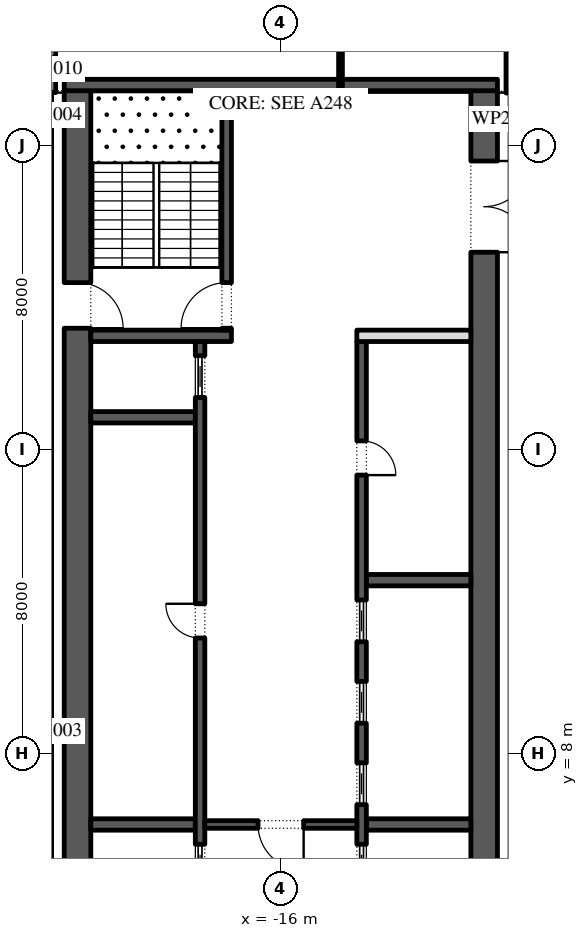
"""IFC4 building model, lengths in metres.
Left out: names, types, materials, properties, quantities, classifications, styles, units other than length and angle.
Written with IfcOpenShell. Run it as: python <this file> out.ifc"""

import sys

from ifc_helpers import new_model, si_unit, direction, frame, frame_2d, origin, place, context, subcontext, project, spatial, rectangle, extrude, element, fill, save


model = new_model("IFC4")
c1 = context("Model", 3, precision=1e-05, world=origin(), true_north=direction((0.0, 1.0)))
c2 = subcontext(c1, "Body", "Model", "MODEL_VIEW")
j1 = project(units=[si_unit("LENGTHUNIT", "METRE"), si_unit("PLANEANGLEUNIT", "RADIAN")], contexts=[c1])
p1 = place(None, origin())
s1 = spatial("IfcSite", under=j1, at=p1, CompositionType="ELEMENT")
p2 = place(p1, origin())
s2 = spatial("IfcBuilding", under=s1, at=p2, CompositionType="ELEMENT")
p3 = place(p2, frame((0.0, 0.0, 205.2)))
s3 = spatial("IfcBuildingStorey", under=s2, at=p3, CompositionType="ELEMENT", Elevation=205.2)
p4 = place(p3, frame((-33.157, 30.092, 0.0), z_axis=(0.0, 0.0, 1.0), x_axis=(0.224950279389, -0.974370243697, 0.0)))
e1 = element("IfcWall", 1, at=p4, inside=s3, PredefinedType="STANDARD", context=c2, shape_type="SweptSolid", body=[
    extrude(rectangle(XDim=49.5, YDim=0.3, at=frame_2d((24.75, 0.0))), origin(), (0.0, 0.0, 1.0), 4.0),
])
p5 = place(p4, frame((2.207, 0.0, 0.0)))
e2 = element("IfcOpeningElement", 2, at=p5, cuts=e1, PredefinedType="OPENING", context=c2, shape_type="SweptSolid", body=[
    extrude(rectangle(XDim=2.4, YDim=3.5, at=frame_2d((1.2, 1.75))), frame((0.0, 0.16, 0.0), z_axis=(0.0, -1.0, 0.0), x_axis=(1.0, 0.0, 0.0)), (0.0, 0.0, 1.0), 0.32),
])
p6 = place(p4, frame((8.121, 0.0, 0.45)))
e3 = element("IfcOpeningElement", 3, at=p6, cuts=e1, PredefinedType="OPENING", context=c2, shape_type="SweptSolid", body=[
    extrude(rectangle(XDim=4.5, YDim=2.825, at=frame_2d((2.25, 1.413))), frame((0.0, 0.16, 0.0), z_axis=(0.0, -1.0, 0.0), x_axis=(1.0, 0.0, 0.0)), (0.0, 0.0, 1.0), 0.32),
])
p7 = place(p4, frame((15.236, 0.0, 0.45)))
e4 = element("IfcOpeningElement", 4, at=p7, cuts=e1, PredefinedType="OPENING", context=c2, shape_type="SweptSolid", body=[
    extrude(rectangle(XDim=4.5, YDim=2.95, at=frame_2d((2.25, 1.475))), frame((0.0, 0.16, 0.0), z_axis=(0.0, -1.0, 0.0), x_axis=(1.0, 0.0, 0.0)), (0.0, 0.0, 1.0), 0.32),
])
p8 = place(p4, frame((22.35, 0.0, 0.45)))
e5 = element("IfcOpeningElement", 5, at=p8, cuts=e1, PredefinedType="OPENING", context=c2, shape_type="SweptSolid", body=[
    extrude(rectangle(XDim=4.5, YDim=3.0, at=frame_2d((2.25, 1.5))), frame((0.0, 0.16, 0.0), z_axis=(0.0, -1.0, 0.0), x_axis=(1.0, 0.0, 0.0)), (0.0, 0.0, 1.0), 0.32),
])
p9 = place(p4, frame((30.514, 0.0, 0.0)))
e6 = element("IfcOpeningElement", 6, at=p9, cuts=e1, PredefinedType="OPENING", context=c2, shape_type="SweptSolid", body=[
    extrude(rectangle(XDim=2.4, YDim=3.5, at=frame_2d((1.2, 1.75))), frame((0.0, 0.16, 0.0), z_axis=(0.0, -1.0, 0.0), x_axis=(1.0, 0.0, 0.0)), (0.0, 0.0, 1.0), 0.32),
])
p10 = place(p4, frame((36.579, 0.0, 0.45)))
e7 = element("IfcOpeningElement", 7, at=p10, cuts=e1, PredefinedType="OPENING", context=c2, shape_type="SweptSolid", body=[
    extrude(rectangle(XDim=4.5, YDim=3.05, at=frame_2d((2.25, 1.525))), frame((0.0, 0.16, 0.0), z_axis=(0.0, -1.0, 0.0), x_axis=(1.0, 0.0, 0.0)), (0.0, 0.0, 1.0), 0.32),
])
p11 = place(p4, frame((43.693, 0.0, 0.45)))
e8 = element("IfcOpeningElement", 8, at=p11, cuts=e1, PredefinedType="OPENING", context=c2, shape_type="SweptSolid", body=[
    extrude(rectangle(XDim=4.5, YDim=3.05, at=frame_2d((2.25, 1.525))), frame((0.0, 0.16, 0.0), z_axis=(0.0, -1.0, 0.0), x_axis=(1.0, 0.0, 0.0)), (0.0, 0.0, 1.0), 0.32),
])
p12 = place(p3, frame((-21.35, -2.45, 0.0), z_axis=(0.0, 0.0, 1.0), x_axis=(0.0, 1.0, 0.0)))
e9 = element("IfcWall", 9, at=p12, inside=s3, PredefinedType="SHEAR", context=c2, shape_type="SweptSolid", body=[
    extrude(rectangle(XDim=27.9, YDim=0.7, at=frame_2d((13.95, 0.0))), origin(), (0.0, 0.0, 1.0), 4.0),
])
p13 = place(p12, frame((5.05, 0.0, 0.0)))
e10 = element("IfcOpeningElement", 10, at=p13, cuts=e9, PredefinedType="OPENING", context=c2, shape_type="SweptSolid", body=[
    extrude(rectangle(XDim=1.2, YDim=2.1, at=frame_2d((0.6, 1.05))), frame((0.0, 0.36, 0.0), z_axis=(0.0, -1.0, 0.0), x_axis=(1.0, 0.0, 0.0)), (0.0, 0.0, 1.0), 0.72),
])
p14 = place(p12, frame((21.65, 0.0, 0.0)))
e11 = element("IfcOpeningElement", 11, at=p14, cuts=e9, PredefinedType="OPENING", context=c2, shape_type="SweptSolid", body=[
    extrude(rectangle(XDim=1.2, YDim=2.1, at=frame_2d((0.6, 1.05))), frame((0.0, 0.36, 0.0), z_axis=(0.0, -1.0, 0.0), x_axis=(1.0, 0.0, 0.0)), (0.0, 0.0, 1.0), 0.72),
])
p15 = place(p3, frame((-10.65, -2.45, 0.0), z_axis=(0.0, 0.0, 1.0), x_axis=(0.0, 1.0, 0.0)))
e12 = element("IfcWall", 12, at=p15, inside=s3, PredefinedType="SHEAR", context=c2, shape_type="SweptSolid", body=[
    extrude(rectangle(XDim=27.9, YDim=0.7, at=frame_2d((13.95, 0.0))), origin(), (0.0, 0.0, 1.0), 4.0),
])
p16 = place(p15, frame((23.65, 0.0, 0.0)))
e13 = element("IfcOpeningElement", 13, at=p16, cuts=e12, PredefinedType="OPENING", context=c2, shape_type="SweptSolid", body=[
    extrude(rectangle(XDim=2.4, YDim=2.1, at=frame_2d((1.2, 1.05))), frame((0.0, 0.36, 0.0), z_axis=(0.0, -1.0, 0.0), x_axis=(1.0, 0.0, 0.0)), (0.0, 0.0, 1.0), 0.72),
])
p17 = place(p15, frame((1.087, 0.0, 0.0)))
e14 = element("IfcOpeningElement", 14, at=p17, cuts=e12, PredefinedType="OPENING", context=c2, shape_type="SweptSolid", body=[
    extrude(rectangle(XDim=0.9, YDim=2.1, at=frame_2d((0.45, 1.05))), frame((0.0, 0.36, 0.0), z_axis=(0.0, -1.0, 0.0), x_axis=(1.0, 0.0, 0.0)), (0.0, 0.0, 1.0), 0.72),
])
p18 = place(p15, frame((4.262, 0.0, 0.0)))
e15 = element("IfcOpeningElement", 15, at=p18, cuts=e12, PredefinedType="OPENING", context=c2, shape_type="SweptSolid", body=[
    extrude(rectangle(XDim=1.0, YDim=2.1, at=frame_2d((0.5, 1.05))), frame((0.0, 0.36, 0.0), z_axis=(0.0, -1.0, 0.0), x_axis=(1.0, 0.0, 0.0)), (0.0, 0.0, 1.0), 0.72),
])
p19 = place(p3, frame((-21.7, 25.6, 0.0), z_axis=(0.0, 0.0, 1.0), x_axis=(1.0, 0.0, 0.0)))
e16 = element("IfcWall", 16, at=p19, inside=s3, PredefinedType="SHEAR", context=c2, shape_type="SweptSolid", body=[
    extrude(rectangle(XDim=11.4, YDim=0.3, at=frame_2d((5.7, 0.0))), origin(), (0.0, 0.0, 1.0), 4.0),
])
p20 = place(p3, frame((-21.0, 19.0, 0.0), z_axis=(0.0, 0.0, 1.0), x_axis=(1.0, 0.0, 0.0)))
e17 = element("IfcWall", 17, at=p20, inside=s3, PredefinedType="SHEAR", context=c2, shape_type="SweptSolid", body=[
    extrude(rectangle(XDim=3.7, YDim=0.3, at=frame_2d((1.85, 0.0))), origin(), (0.0, 0.0, 1.0), 4.0),
])
p21 = place(p3, frame((-17.425, 19.15, 0.0), z_axis=(0.0, 0.0, 1.0), x_axis=(0.0, 1.0, 0.0)))
e18 = element("IfcWall", 18, at=p21, inside=s3, PredefinedType="SHEAR", context=c2, shape_type="SweptSolid", body=[
    extrude(rectangle(XDim=6.3, YDim=0.25, at=frame_2d((3.15, 0.0))), origin(), (0.0, 0.0, 1.0), 4.0),
])
p22 = place(p21, frame((0.05, 0.0, 0.0)))
e19 = element("IfcOpeningElement", 19, at=p22, cuts=e18, PredefinedType="OPENING", context=c2, shape_type="SweptSolid", body=[
    extrude(rectangle(XDim=1.2, YDim=2.1, at=frame_2d((0.6, 1.05))), frame((0.0, 0.135, 0.0), z_axis=(0.0, -1.0, 0.0), x_axis=(1.0, 0.0, 0.0)), (0.0, 0.0, 1.0), 0.27),
])
for number, where, z_axis, x_axis in (
    (20, (-21.0, 6.143, 0.0), (0.0, 0.0, 1.0), (1.0, 0.0, 0.0)),
    (21, (-21.0, 16.857, 0.0), (0.0, 0.0, 1.0), (1.0, 0.0, 0.0)),
):
    element("IfcWall", number, at=place(p3, frame(where, z_axis=z_axis, x_axis=x_axis)), inside=s3, PredefinedType="SHEAR", context=c2, shape_type="SweptSolid", body=[
        extrude(rectangle(XDim=2.75, YDim=0.3, at=frame_2d((1.375, 0.0))), origin(), (0.0, 0.0, 1.0), 4.0),
    ])
p23 = place(p3, frame((-18.125, 4.15, 0.0), z_axis=(0.0, 0.0, 1.0), x_axis=(0.0, 1.0, 0.0)))
e22 = element("IfcWall", 22, at=p23, inside=s3, PredefinedType="SHEAR", context=c2, shape_type="SweptSolid", body=[
    extrude(rectangle(XDim=14.7, YDim=0.25, at=frame_2d((7.35, 0.0))), origin(), (0.0, 0.0, 1.0), 4.0),
])
p24 = place(p23, frame((6.9, 0.0, 0.0)))
e23 = element("IfcOpeningElement", 23, at=p24, cuts=e22, PredefinedType="OPENING", context=c2, shape_type="SweptSolid", body=[
    extrude(rectangle(XDim=0.9, YDim=2.1, at=frame_2d((0.45, 1.05))), frame((0.0, 0.135, 0.0), z_axis=(0.0, -1.0, 0.0), x_axis=(1.0, 0.0, 0.0)), (0.0, 0.0, 1.0), 0.27),
])
p25 = place(p23, frame((0.371, 0.0, 0.0)))
e24 = element("IfcOpeningElement", 24, at=p25, cuts=e22, PredefinedType="OPENING", context=c2, shape_type="SweptSolid", body=[
    extrude(rectangle(XDim=1.1, YDim=2.1, at=frame_2d((0.55, 1.05))), frame((0.0, 0.135, 0.0), z_axis=(0.0, -1.0, 0.0), x_axis=(1.0, 0.0, 0.0)), (0.0, 0.0, 1.0), 0.27),
])
p26 = place(p23, frame((13.229, 0.0, 0.0)))
e25 = element("IfcOpeningElement", 25, at=p26, cuts=e22, PredefinedType="OPENING", context=c2, shape_type="SweptSolid", body=[
    extrude(rectangle(XDim=1.1, YDim=2.1, at=frame_2d((0.55, 1.05))), frame((0.0, 0.135, 0.0), z_axis=(0.0, -1.0, 0.0), x_axis=(1.0, 0.0, 0.0)), (0.0, 0.0, 1.0), 0.27),
])
for number, where, z_axis, x_axis in (
    (26, (-13.75, 6.143, 0.0), (0.0, 0.0, 1.0), (1.0, 0.0, 0.0)),
    (27, (-13.75, 12.571, 0.0), (0.0, 0.0, 1.0), (1.0, 0.0, 0.0)),
):
    element("IfcWall", number, at=place(p3, frame(where, z_axis=z_axis, x_axis=x_axis)), inside=s3, PredefinedType="SHEAR", context=c2, shape_type="SweptSolid", body=[
        extrude(rectangle(XDim=2.75, YDim=0.3, at=frame_2d((1.375, 0.0))), origin(), (0.0, 0.0, 1.0), 4.0),
    ])
p27 = place(p3, frame((-13.875, -2.45, 0.0), z_axis=(0.0, 0.0, 1.0), x_axis=(0.0, 1.0, 0.0)))
e28 = element("IfcWall", 28, at=p27, inside=s3, PredefinedType="SHEAR", context=c2, shape_type="SweptSolid", body=[
    extrude(rectangle(XDim=21.3, YDim=0.25, at=frame_2d((10.65, 0.0))), origin(), (0.0, 0.0, 1.0), 4.0),
])
p28 = place(p27, frame((17.786, 0.0, 0.0)))
e29 = element("IfcOpeningElement", 29, at=p28, cuts=e28, PredefinedType="OPENING", context=c2, shape_type="SweptSolid", body=[
    extrude(rectangle(XDim=0.9, YDim=2.1, at=frame_2d((0.45, 1.05))), frame((0.0, 0.135, 0.0), z_axis=(0.0, -1.0, 0.0), x_axis=(1.0, 0.0, 0.0)), (0.0, 0.0, 1.0), 0.27),
])
p29 = place(p27, frame((6.971, 0.0, 0.0)))
e30 = element("IfcOpeningElement", 30, at=p29, cuts=e28, PredefinedType="OPENING", context=c2, shape_type="SweptSolid", body=[
    extrude(rectangle(XDim=1.1, YDim=2.1, at=frame_2d((0.55, 1.05))), frame((0.0, 0.135, 0.0), z_axis=(0.0, -1.0, 0.0), x_axis=(1.0, 0.0, 0.0)), (0.0, 0.0, 1.0), 0.27),
])
p30 = place(p27, frame((9.114, 0.0, 0.0)))
e31 = element("IfcOpeningElement", 31, at=p30, cuts=e28, PredefinedType="OPENING", context=c2, shape_type="SweptSolid", body=[
    extrude(rectangle(XDim=1.1, YDim=2.1, at=frame_2d((0.55, 1.05))), frame((0.0, 0.135, 0.0), z_axis=(0.0, -1.0, 0.0), x_axis=(1.0, 0.0, 0.0)), (0.0, 0.0, 1.0), 0.27),
])
p31 = place(p27, frame((11.257, 0.0, 0.0)))
e32 = element("IfcOpeningElement", 32, at=p31, cuts=e28, PredefinedType="OPENING", context=c2, shape_type="SweptSolid", body=[
    extrude(rectangle(XDim=1.1, YDim=2.1, at=frame_2d((0.55, 1.05))), frame((0.0, 0.135, 0.0), z_axis=(0.0, -1.0, 0.0), x_axis=(1.0, 0.0, 0.0)), (0.0, 0.0, 1.0), 0.27),
])
p32 = place(p27, frame((13.4, 0.0, 0.0)))
e33 = element("IfcOpeningElement", 33, at=p32, cuts=e28, PredefinedType="OPENING", context=c2, shape_type="SweptSolid", body=[
    extrude(rectangle(XDim=1.1, YDim=2.1, at=frame_2d((0.55, 1.05))), frame((0.0, 0.135, 0.0), z_axis=(0.0, -1.0, 0.0), x_axis=(1.0, 0.0, 0.0)), (0.0, 0.0, 1.0), 0.27),
])
p33 = place(p3, frame((-14.0, 19.0, 0.0), z_axis=(0.0, 0.0, 1.0), x_axis=(1.0, 0.0, 0.0)))
e34 = element("IfcWall", 34, at=p33, inside=s3, PredefinedType="PARTITIONING", context=c2, shape_type="SweptSolid", body=[
    extrude(rectangle(XDim=3.0, YDim=0.3, at=frame_2d((1.5, 0.0))), origin(), (0.0, 0.0, 1.0), 4.0),
])
p34 = place(p3, frame((-18.0, 6.143, 0.0), z_axis=(0.0, 0.0, 1.0), x_axis=(1.0, 0.0, 0.0)))
e35 = element("IfcWall", 35, at=p34, inside=s3, PredefinedType="SHEAR", context=c2, shape_type="SweptSolid", body=[
    extrude(rectangle(XDim=4.0, YDim=0.2, at=frame_2d((2.0, 0.0))), origin(), (0.0, 0.0, 1.0), 4.0),
])
p35 = place(p34, frame((1.4, 0.0, 0.0)))
e36 = element("IfcOpeningElement", 36, at=p35, cuts=e35, PredefinedType="OPENING", context=c2, shape_type="SweptSolid", body=[
    extrude(rectangle(XDim=1.2, YDim=2.1, at=frame_2d((0.6, 1.05))), frame((0.0, 0.11, 0.0), z_axis=(0.0, -1.0, 0.0), x_axis=(1.0, 0.0, 0.0)), (0.0, 0.0, 1.0), 0.22),
])
p36 = place(p3, frame((-22.0, 27.125, 0.0), z_axis=(0.0, 0.0, 1.0), x_axis=(0.0, -1.0, 0.0)))
e37 = element("IfcWall", 37, at=p36, inside=s3, PredefinedType="PARTITIONING", context=c2, shape_type="SweptSolid", body=[
    extrude(rectangle(XDim=1.725, YDim=0.15, at=frame_2d((0.863, 0.0))), origin(), (0.0, 0.0, 1.0), 4.0),
])
p37 = place(p3, frame((-14.43, 38.193, 0.0), z_axis=(0.0, 0.0, 1.0), x_axis=(0.0, -1.0, 0.0)))
e38 = element("IfcWall", 38, at=p37, inside=s3, PredefinedType="PARTITIONING", context=c2, shape_type="SweptSolid", body=[
    extrude(rectangle(XDim=12.793, YDim=0.1, at=frame_2d((6.396, 0.0))), origin(), (0.0, 0.0, 1.0), 4.0),
])
p38 = place(p37, frame((4.473, 0.0, 0.0)))
e39 = element("IfcOpeningElement", 39, at=p38, cuts=e38, PredefinedType="OPENING", context=c2, shape_type="SweptSolid", body=[
    extrude(rectangle(XDim=0.9, YDim=2.1, at=frame_2d((0.45, 1.05))), frame((0.0, 0.06, 0.0), z_axis=(0.0, -1.0, 0.0), x_axis=(1.0, 0.0, 0.0)), (0.0, 0.0, 1.0), 0.12),
])
p39 = place(p3, frame((-10.0, 25.39, 0.0), z_axis=(0.0, 0.0, 1.0), x_axis=(0.0, 1.0, 0.0)))
e40 = element("IfcWall", 40, at=p39, inside=s3, PredefinedType="PARTITIONING", context=c2, shape_type="SweptSolid", body=[
    extrude(rectangle(XDim=1.81, YDim=0.15, at=frame_2d((0.905, 0.0))), origin(), (0.0, 0.0, 1.0), 4.0),
])
p40 = place(p24, origin())
e41 = element("IfcDoor", 41, at=p40, inside=s3, OperationType="SINGLE_SWING_LEFT", PredefinedType="DOOR", context=c2, shape_type="SweptSolid", body=[
    extrude(rectangle(XDim=0.9, YDim=2.1, at=frame_2d((0.45, 1.05))), frame((0.0, 0.125, 0.0), z_axis=(0.0, -1.0, 0.0), x_axis=(1.0, 0.0, 0.0)), (0.0, 0.0, 1.0), 0.05),
])
fill(e23, e41)
p41 = place(p25, origin())
e42 = element("IfcDoor", 42, at=p41, inside=s3, OperationType="SLIDING_TO_LEFT", PredefinedType="DOOR", context=c2, shape_type="SweptSolid", body=[
    extrude(rectangle(XDim=1.1, YDim=2.1, at=frame_2d((0.55, 1.05))), frame((0.0, 0.025, 0.0), z_axis=(0.0, -1.0, 0.0), x_axis=(1.0, 0.0, 0.0)), (0.0, 0.0, 1.0), 0.05),
])
fill(e24, e42)
p42 = place(p26, origin())
e43 = element("IfcDoor", 43, at=p42, inside=s3, OperationType="SLIDING_TO_LEFT", PredefinedType="DOOR", context=c2, shape_type="SweptSolid", body=[
    extrude(rectangle(XDim=1.1, YDim=2.1, at=frame_2d((0.55, 1.05))), frame((0.0, 0.025, 0.0), z_axis=(0.0, -1.0, 0.0), x_axis=(1.0, 0.0, 0.0)), (0.0, 0.0, 1.0), 0.05),
])
fill(e25, e43)
p43 = place(p28, frame((0.9, -0.2, 0.0), z_axis=(0.0, 0.0, 1.0), x_axis=(-1.0, 0.0, 0.0)))
e44 = element("IfcDoor", 44, at=p43, inside=s3, OperationType="SINGLE_SWING_LEFT", PredefinedType="DOOR", context=c2, shape_type="SweptSolid", body=[
    extrude(rectangle(XDim=0.9, YDim=2.1, at=frame_2d((0.45, 1.05))), frame((0.0, -0.075, 0.0), z_axis=(0.0, -1.0, 0.0), x_axis=(1.0, 0.0, 0.0)), (0.0, 0.0, 1.0), 0.05),
])
fill(e29, e44)
p44 = place(p29, origin())
e45 = element("IfcDoor", 45, at=p44, inside=s3, OperationType="SLIDING_TO_LEFT", PredefinedType="DOOR", context=c2, shape_type="SweptSolid", body=[
    extrude(rectangle(XDim=1.1, YDim=2.1, at=frame_2d((0.55, 1.05))), frame((0.0, 0.025, 0.0), z_axis=(0.0, -1.0, 0.0), x_axis=(1.0, 0.0, 0.0)), (0.0, 0.0, 1.0), 0.05),
])
fill(e30, e45)
p45 = place(p30, origin())
e46 = element("IfcDoor", 46, at=p45, inside=s3, OperationType="SLIDING_TO_LEFT", PredefinedType="DOOR", context=c2, shape_type="SweptSolid", body=[
    extrude(rectangle(XDim=1.1, YDim=2.1, at=frame_2d((0.55, 1.05))), frame((0.0, 0.025, 0.0), z_axis=(0.0, -1.0, 0.0), x_axis=(1.0, 0.0, 0.0)), (0.0, 0.0, 1.0), 0.05),
])
fill(e31, e46)
p46 = place(p31, origin())
e47 = element("IfcDoor", 47, at=p46, inside=s3, OperationType="SLIDING_TO_LEFT", PredefinedType="DOOR", context=c2, shape_type="SweptSolid", body=[
    extrude(rectangle(XDim=1.1, YDim=2.1, at=frame_2d((0.55, 1.05))), frame((0.0, 0.025, 0.0), z_axis=(0.0, -1.0, 0.0), x_axis=(1.0, 0.0, 0.0)), (0.0, 0.0, 1.0), 0.05),
])
fill(e32, e47)
p47 = place(p32, origin())
e48 = element("IfcDoor", 48, at=p47, inside=s3, OperationType="SLIDING_TO_LEFT", PredefinedType="DOOR", context=c2, shape_type="SweptSolid", body=[
    extrude(rectangle(XDim=1.1, YDim=2.1, at=frame_2d((0.55, 1.05))), frame((0.0, 0.025, 0.0), z_axis=(0.0, -1.0, 0.0), x_axis=(1.0, 0.0, 0.0)), (0.0, 0.0, 1.0), 0.05),
])
fill(e33, e48)
p48 = place(p35, frame((1.2, 0.0, 0.0), z_axis=(0.0, 0.0, 1.0), x_axis=(-1.0, 0.0, 0.0)))
e49 = element("IfcDoor", 49, at=p48, inside=s3, OperationType="SINGLE_SWING_RIGHT", PredefinedType="DOOR", context=c2, shape_type="SweptSolid", body=[
    extrude(rectangle(XDim=1.2, YDim=2.1, at=frame_2d((0.6, 1.05))), frame((0.0, 0.025, 0.0), z_axis=(0.0, -1.0, 0.0), x_axis=(1.0, 0.0, 0.0)), (0.0, 0.0, 1.0), 0.05),
])
fill(e36, e49)
p49 = place(p16, frame((2.4, 0.0, 0.0), z_axis=(0.0, 0.0, 1.0), x_axis=(-1.0, 0.0, 0.0)))
e50 = element("IfcDoor", 50, at=p49, inside=s3, OperationType="DOUBLE_DOOR_SINGLE_SWING", PredefinedType="DOOR", context=c2, shape_type="SweptSolid", body=[
    extrude(rectangle(XDim=2.4, YDim=2.1, at=frame_2d((1.2, 1.05))), frame((0.0, 0.025, 0.0), z_axis=(0.0, -1.0, 0.0), x_axis=(1.0, 0.0, 0.0)), (0.0, 0.0, 1.0), 0.05),
])
fill(e13, e50)
p50 = place(p22, origin())
e51 = element("IfcDoor", 51, at=p50, inside=s3, OperationType="SINGLE_SWING_RIGHT", PredefinedType="DOOR", context=c2, shape_type="SweptSolid", body=[
    extrude(rectangle(XDim=1.2, YDim=2.1, at=frame_2d((0.6, 1.05))), frame((0.0, 0.025, 0.0), z_axis=(0.0, -1.0, 0.0), x_axis=(1.0, 0.0, 0.0)), (0.0, 0.0, 1.0), 0.05),
])
fill(e19, e51)
p51 = place(p14, frame((1.2, 0.0, 0.0), z_axis=(0.0, 0.0, 1.0), x_axis=(-1.0, 0.0, 0.0)))
e52 = element("IfcDoor", 52, at=p51, inside=s3, OperationType="SINGLE_SWING_LEFT", PredefinedType="DOOR", context=c2, shape_type="SweptSolid", body=[
    extrude(rectangle(XDim=1.2, YDim=2.1, at=frame_2d((0.6, 1.05))), frame((0.0, 0.025, 0.0), z_axis=(0.0, -1.0, 0.0), x_axis=(1.0, 0.0, 0.0)), (0.0, 0.0, 1.0), 0.05),
])
fill(e11, e52)
save(model, sys.argv[1])
